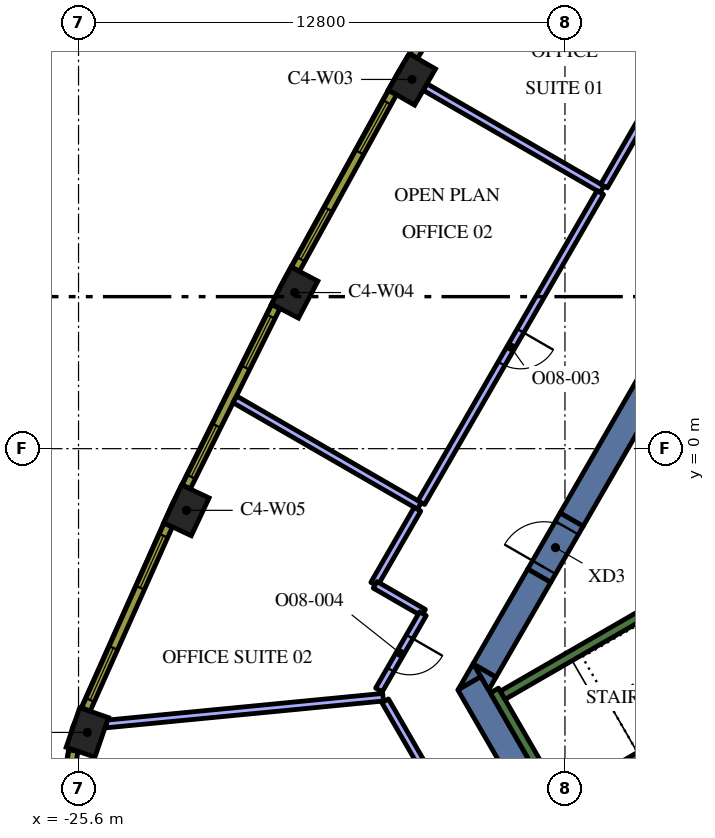
"""IFC4 building model, lengths in metres.
Left out: names, types, materials, properties, quantities, classifications, styles, units other than length and angle.
Written with IfcOpenShell. Run it as: python <this file> out.ifc"""

import sys

from ifc_helpers import new_model, si_unit, direction, frame, frame_2d, origin, origin_2d, place, context, subcontext, project, spatial, polyline, rectangle, outline, extrude, element, fill, save


model = new_model("IFC4")
c1 = context("Model", 3, precision=1e-05, world=origin(), true_north=direction((0.0, 1.0)))
c2 = subcontext(c1, "Body", "Model", "MODEL_VIEW")
j1 = project(units=[si_unit("LENGTHUNIT", "METRE"), si_unit("PLANEANGLEUNIT", "RADIAN")], contexts=[c1])
p1 = place(None, origin())
s1 = spatial("IfcSite", under=j1, at=p1, CompositionType="ELEMENT")
p2 = place(p1, origin())
s2 = spatial("IfcBuilding", under=s1, at=p2, CompositionType="ELEMENT")
p3 = place(p2, frame((0.0, 0.0, 226.8)))
s3 = spatial("IfcBuildingStorey", under=s2, at=p3, CompositionType="ELEMENT", Elevation=226.8)
for number, where, z_axis, x_axis in (
    (1, (-16.827, 9.715, 0.0), (0.0, 0.0, 1.0), (-0.5, -0.866, 0.0)),
    (2, (-19.912, 4.108, 0.0), (0.0, 0.0, 1.0), (-0.464, -0.886, 0.0)),
    (3, (-22.76, -1.623, 0.0), (0.0, 0.0, 1.0), (-0.426, -0.905, 0.0)),
    (4, (-25.369, -7.466, 0.0), (0.0, 0.0, 1.0), (-0.324, -0.946, 0.0)),
):
    element("IfcColumn", number, at=place(p3, frame(where, z_axis=z_axis, x_axis=x_axis)), inside=s3, PredefinedType="COLUMN", context=c2, shape_type="SweptSolid", body=[
        extrude(rectangle(XDim=1.1, YDim=0.8, at=origin_2d()), origin(), (0.0, 0.0, 1.0), 4.2),
    ])
p4 = place(p3, frame((-13.402, -9.487, 0.0), z_axis=(0.0, 0.0, 1.0), x_axis=(-0.500020498207, 0.866013568815, 0.0)))
e5 = element("IfcWall", 5, at=p4, inside=s3, PredefinedType="SOLIDWALL", context=c2, shape_type="SweptSolid", body=[
    extrude(rectangle(XDim=3.829, YDim=0.7, at=frame_2d((1.915, 0.0))), origin(), (0.0, 0.0, 1.0), 4.2),
])
p5 = place(p3, origin())
e6 = element("IfcWall", 6, at=p5, inside=s3, PredefinedType="SOLIDWALL", context=c2, shape_type="SweptSolid", body=[
    extrude(outline(polyline([(-15.014, -5.995), (-15.611, -6.339), (-15.213, -5.65), (-15.014, -5.995)])), origin(), (0.0, 0.0, 1.0), 4.2),
])
p6 = place(p3, frame((-13.475, -3.339, 0.0), z_axis=(0.0, 0.0, 1.0), x_axis=(-0.499944726303, -0.866057313716, 0.0)))
e7 = element("IfcWall", 7, at=p6, inside=s3, PredefinedType="SOLIDWALL", context=c2, shape_type="SweptSolid", body=[
    extrude(rectangle(XDim=2.884, YDim=0.7, at=frame_2d((1.442, 0.0))), origin(), (0.0, 0.0, 1.0), 4.2),
])
e8 = element("IfcWall", 8, at=p5, inside=s3, PredefinedType="SOLIDWALL", context=c2, shape_type="SweptSolid", body=[
    extrude(outline(polyline([(-14.809, -6.35), (-15.197, -5.678), (-14.615, -6.014), (-14.809, -6.35)])), origin(), (0.0, 0.0, 1.0), 4.2),
])
p7 = place(p3, frame((-12.625, -1.867, 0.0), z_axis=(0.0, 0.0, 1.0), x_axis=(0.500008520515, 0.866020484407, 0.0)))
e9 = element("IfcWall", 9, at=p7, inside=s3, PredefinedType="SOLIDWALL", context=c2, shape_type="SweptSolid", body=[
    extrude(rectangle(XDim=15.859, YDim=0.7, at=frame_2d((7.929, 0.0))), origin(), (0.0, 0.0, 1.0), 4.2),
])
p8 = place(p3, frame((-12.84, -9.511, 0.0), z_axis=(0.0, 0.0, 1.0), x_axis=(-0.499997733992, 0.866026712061, 0.0)))
e10 = element("IfcWall", 10, at=p8, inside=s3, PredefinedType="SOLIDWALL", context=c2, shape_type="SweptSolid", body=[
    extrude(rectangle(XDim=3.634, YDim=0.25, at=frame_2d((1.817, 0.0))), origin(), (0.0, 0.0, 1.0), 4.2),
])
p9 = place(p3, frame((-14.44, -6.49, 0.0), z_axis=(0.0, 0.0, 1.0), x_axis=(0.866022966069, 0.500004222222, 0.0)))
e11 = element("IfcWall", 11, at=p9, inside=s3, PredefinedType="SOLIDWALL", context=c2, shape_type="SweptSolid", body=[
    extrude(rectangle(XDim=6.8, YDim=0.25, at=frame_2d((3.4, 0.0))), origin(), (0.0, 0.0, 1.0), 4.2),
])
p10 = place(p3, frame((-12.84, -9.261, 0.0), z_axis=(0.0, 0.0, 1.0), x_axis=(0.866016039709, 0.500016218704, 0.0)))
e12 = element("IfcWall", 12, at=p10, inside=s3, PredefinedType="SOLIDWALL", context=c2, shape_type="SweptSolid", body=[
    extrude(rectangle(XDim=7.05, YDim=0.25, at=frame_2d((3.525, 0.0))), origin(), (0.0, 0.0, 1.0), 4.2),
])
p11 = place(p3, frame((-13.475, -3.339, 0.0), z_axis=(0.0, 0.0, 1.0), x_axis=(0.499954529098, 0.86605165483, 0.0)))
e13 = element("IfcWall", 13, at=p11, inside=s3, PredefinedType="SOLIDWALL", context=c2, shape_type="SweptSolid", body=[
    extrude(rectangle(XDim=1.7, YDim=0.7, at=frame_2d((0.85, 0.0))), origin(), (0.0, 0.0, 1.0), 4.2),
])
p12 = place(p11, frame((0.25, 0.0, 0.0)))
e14 = element("IfcOpeningElement", 14, at=p12, cuts=e13, PredefinedType="OPENING", context=c2, shape_type="SweptSolid", body=[
    extrude(rectangle(XDim=1.2, YDim=2.1, at=frame_2d((0.6, 1.05))), frame((0.0, 0.36, 0.0), z_axis=(0.0, -1.0, 0.0), x_axis=(1.0, 0.0, 0.0)), (0.0, 0.0, 1.0), 0.72),
])
p13 = place(p3, frame((-11.821, 6.825, 0.0), z_axis=(0.0, 0.0, 1.0), x_axis=(-0.866011792348, 0.500023574959, 0.0)))
e15 = element("IfcWall", 15, at=p13, inside=s3, PredefinedType="PARTITIONING", context=c2, shape_type="SweptSolid", body=[
    extrude(rectangle(XDim=5.381, YDim=0.2, at=frame_2d((2.69, 0.0))), origin(), (0.0, 0.0, 1.0), 3.45),
])
p14 = place(p3, frame((-7.061, 15.069, 0.0), z_axis=(0.0, 0.0, 1.0), x_axis=(-0.500008127286, -0.866020711443, 0.0)))
e16 = element("IfcWall", 16, at=p14, inside=s3, PredefinedType="PARTITIONING", context=c2, shape_type="SweptSolid", body=[
    extrude(rectangle(XDim=9.42, YDim=0.2, at=frame_2d((4.71, 0.0))), origin(), (0.0, 0.0, 1.0), 3.45),
])
p15 = place(p14, frame((4.2, 0.0, 0.0)))
e17 = element("IfcOpeningElement", 17, at=p15, cuts=e16, PredefinedType="OPENING", context=c2, shape_type="SweptSolid", body=[
    extrude(rectangle(XDim=1.0, YDim=2.1, at=frame_2d((0.5, 1.05))), frame((0.0, 0.11, 0.0), z_axis=(0.0, -1.0, 0.0), x_axis=(1.0, 0.0, 0.0)), (0.0, 0.0, 1.0), 0.22),
])
p16 = place(p3, frame((-16.631, -1.506, 0.0), z_axis=(0.0, 0.0, 1.0), x_axis=(-0.866045655253, 0.499964921787, 0.0)))
e18 = element("IfcWall", 18, at=p16, inside=s3, PredefinedType="PARTITIONING", context=c2, shape_type="SweptSolid", body=[
    extrude(rectangle(XDim=5.607, YDim=0.2, at=frame_2d((2.804, 0.0))), origin(), (0.0, 0.0, 1.0), 3.45),
])
p17 = place(p3, frame((-11.871, 6.738, 0.0), z_axis=(0.0, 0.0, 1.0), x_axis=(-0.500019350398, -0.866014231539, 0.0)))
e19 = element("IfcWall", 19, at=p17, inside=s3, PredefinedType="PARTITIONING", context=c2, shape_type="SweptSolid", body=[
    extrude(rectangle(XDim=9.42, YDim=0.2, at=frame_2d((4.71, 0.0))), origin(), (0.0, 0.0, 1.0), 3.45),
])
p18 = place(p17, frame((4.2, 0.0, 0.0)))
e20 = element("IfcOpeningElement", 20, at=p18, cuts=e19, PredefinedType="OPENING", context=c2, shape_type="SweptSolid", body=[
    extrude(rectangle(XDim=1.0, YDim=2.1, at=frame_2d((0.5, 1.05))), frame((0.0, 0.11, 0.0), z_axis=(0.0, -1.0, 0.0), x_axis=(1.0, 0.0, 0.0)), (0.0, 0.0, 1.0), 0.22),
])
p19 = place(p3, frame((-17.586, -6.54, 0.0), z_axis=(0.0, 0.0, 1.0), x_axis=(-0.995357542522, -0.096246363795, 0.0)))
e21 = element("IfcWall", 21, at=p19, inside=s3, PredefinedType="PARTITIONING", context=c2, shape_type="SweptSolid", body=[
    extrude(rectangle(XDim=7.318, YDim=0.2, at=frame_2d((3.659, 0.0))), origin(), (0.0, 0.0, 1.0), 3.45),
])
p20 = place(p3, frame((-16.681, -1.593, 0.0), z_axis=(0.0, 0.0, 1.0), x_axis=(-0.499985038317, -0.866034041744, 0.0)))
e22 = element("IfcWall", 22, at=p20, inside=s3, PredefinedType="PARTITIONING", context=c2, shape_type="SweptSolid", body=[
    extrude(rectangle(XDim=2.28, YDim=0.2, at=frame_2d((1.14, 0.0))), origin(), (0.0, 0.0, 1.0), 3.45),
])
p21 = place(p3, frame((-17.795, -3.582, 0.0), z_axis=(0.0, 0.0, 1.0), x_axis=(0.866016893711, -0.50001473959, 0.0)))
e23 = element("IfcWall", 23, at=p21, inside=s3, PredefinedType="PARTITIONING", context=c2, shape_type="SweptSolid", body=[
    extrude(rectangle(XDim=1.47, YDim=0.2, at=frame_2d((0.735, 0.0))), origin(), (0.0, 0.0, 1.0), 3.45),
])
p22 = place(p3, frame((-16.537, -4.343, 0.0), z_axis=(0.0, 0.0, 1.0), x_axis=(-0.500014285048, -0.866017156151, 0.0)))
e24 = element("IfcWall", 24, at=p22, inside=s3, PredefinedType="PARTITIONING", context=c2, shape_type="SweptSolid", body=[
    extrude(rectangle(XDim=2.317, YDim=0.2, at=frame_2d((1.159, 0.0))), origin(), (0.0, 0.0, 1.0), 3.45),
])
p23 = place(p22, frame((0.7, 0.0, 0.0)))
e25 = element("IfcOpeningElement", 25, at=p23, cuts=e24, PredefinedType="OPENING", context=c2, shape_type="SweptSolid", body=[
    extrude(rectangle(XDim=1.0, YDim=2.1, at=frame_2d((0.5, 1.05))), frame((0.0, 0.11, 0.0), z_axis=(0.0, -1.0, 0.0), x_axis=(1.0, 0.0, 0.0)), (0.0, 0.0, 1.0), 0.22),
])
p24 = place(p3, frame((-17.531, -6.635, 0.0), z_axis=(0.0, 0.0, 1.0), x_axis=(0.500009459589, -0.866019942219, 0.0)))
e26 = element("IfcWall", 26, at=p24, inside=s3, PredefinedType="PARTITIONING", context=c2, shape_type="SweptSolid", body=[
    extrude(rectangle(XDim=6.038, YDim=0.2, at=frame_2d((3.019, 0.0))), origin(), (0.0, 0.0, 1.0), 3.45),
])
p25 = place(p24, frame((2.5, 0.0, 0.0)))
e27 = element("IfcOpeningElement", 27, at=p25, cuts=e26, PredefinedType="OPENING", context=c2, shape_type="SweptSolid", body=[
    extrude(rectangle(XDim=1.0, YDim=2.1, at=frame_2d((0.5, 1.05))), frame((0.0, 0.11, 0.0), z_axis=(0.0, -1.0, 0.0), x_axis=(1.0, 0.0, 0.0)), (0.0, 0.0, 1.0), 0.22),
])
p26 = place(p3, frame((-14.038, 14.864, 0.0), z_axis=(0.0, 0.0, 1.0), x_axis=(-0.517846166225, -0.855473756538, 0.0)))
e28 = element("IfcWall", 28, at=p26, inside=s3, PredefinedType="SOLIDWALL", context=c2, shape_type="SweptSolid", body=[
    extrude(rectangle(XDim=5.298, YDim=0.24, at=frame_2d((2.649, 0.0))), origin(), (0.0, 0.0, 1.0), 3.95),
])
p27 = place(p26, frame((0.294, 0.0, 0.9)))
e29 = element("IfcOpeningElement", 29, at=p27, cuts=e28, PredefinedType="OPENING", context=c2, shape_type="SweptSolid", body=[
    extrude(rectangle(XDim=1.5, YDim=2.55, at=frame_2d((0.75, 1.275))), frame((0.0, 0.13, 0.0), z_axis=(0.0, -1.0, 0.0), x_axis=(1.0, 0.0, 0.0)), (0.0, 0.0, 1.0), 0.26),
])
p28 = place(p26, frame((3.504, 0.0, 0.9)))
e30 = element("IfcOpeningElement", 30, at=p28, cuts=e28, PredefinedType="OPENING", context=c2, shape_type="SweptSolid", body=[
    extrude(rectangle(XDim=1.5, YDim=2.55, at=frame_2d((0.75, 1.275))), frame((0.0, 0.13, 0.0), z_axis=(0.0, -1.0, 0.0), x_axis=(1.0, 0.0, 0.0)), (0.0, 0.0, 1.0), 0.26),
])
p29 = place(p3, frame((-17.338, 9.368, 0.0), z_axis=(0.0, 0.0, 1.0), x_axis=(-0.481925825015, -0.876212017256, 0.0)))
e31 = element("IfcWall", 31, at=p29, inside=s3, PredefinedType="SOLIDWALL", context=c2, shape_type="SweptSolid", body=[
    extrude(rectangle(XDim=5.299, YDim=0.24, at=frame_2d((2.649, 0.0))), origin(), (0.0, 0.0, 1.0), 3.95),
])
p30 = place(p29, frame((0.295, 0.0, 0.9)))
e32 = element("IfcOpeningElement", 32, at=p30, cuts=e31, PredefinedType="OPENING", context=c2, shape_type="SweptSolid", body=[
    extrude(rectangle(XDim=1.5, YDim=2.55, at=frame_2d((0.75, 1.275))), frame((0.0, 0.13, 0.0), z_axis=(0.0, -1.0, 0.0), x_axis=(1.0, 0.0, 0.0)), (0.0, 0.0, 1.0), 0.26),
])
p31 = place(p29, frame((3.504, 0.0, 0.9)))
e33 = element("IfcOpeningElement", 33, at=p31, cuts=e31, PredefinedType="OPENING", context=c2, shape_type="SweptSolid", body=[
    extrude(rectangle(XDim=1.5, YDim=2.55, at=frame_2d((0.75, 1.275))), frame((0.0, 0.13, 0.0), z_axis=(0.0, -1.0, 0.0), x_axis=(1.0, 0.0, 0.0)), (0.0, 0.0, 1.0), 0.26),
])
p32 = place(p3, frame((-20.407, 3.74, 0.0), z_axis=(0.0, 0.0, 1.0), x_axis=(-0.445129582031, -0.895466166419, 0.0)))
e34 = element("IfcWall", 34, at=p32, inside=s3, PredefinedType="SOLIDWALL", context=c2, shape_type="SweptSolid", body=[
    extrude(rectangle(XDim=5.298, YDim=0.24, at=frame_2d((2.649, 0.0))), origin(), (0.0, 0.0, 1.0), 3.95),
])
p33 = place(p32, frame((0.295, 0.0, 0.9)))
e35 = element("IfcOpeningElement", 35, at=p33, cuts=e34, PredefinedType="OPENING", context=c2, shape_type="SweptSolid", body=[
    extrude(rectangle(XDim=1.5, YDim=2.55, at=frame_2d((0.75, 1.275))), frame((0.0, 0.13, 0.0), z_axis=(0.0, -1.0, 0.0), x_axis=(1.0, 0.0, 0.0)), (0.0, 0.0, 1.0), 0.26),
])
p34 = place(p32, frame((3.504, 0.0, 0.9)))
e36 = element("IfcOpeningElement", 36, at=p34, cuts=e34, PredefinedType="OPENING", context=c2, shape_type="SweptSolid", body=[
    extrude(rectangle(XDim=1.5, YDim=2.55, at=frame_2d((0.75, 1.275))), frame((0.0, 0.13, 0.0), z_axis=(0.0, -1.0, 0.0), x_axis=(1.0, 0.0, 0.0)), (0.0, 0.0, 1.0), 0.26),
])
p35 = place(p3, frame((-23.24, -2.011, 0.0), z_axis=(0.0, 0.0, 1.0), x_axis=(-0.407579651789, -0.913169659728, 0.0)))
e37 = element("IfcWall", 37, at=p35, inside=s3, PredefinedType="SOLIDWALL", context=c2, shape_type="SweptSolid", body=[
    extrude(rectangle(XDim=5.311, YDim=0.24, at=frame_2d((2.655, 0.0))), origin(), (0.0, 0.0, 1.0), 3.95),
])
p36 = place(p35, frame((0.306, 0.0, 0.9)))
e38 = element("IfcOpeningElement", 38, at=p36, cuts=e37, PredefinedType="OPENING", context=c2, shape_type="SweptSolid", body=[
    extrude(rectangle(XDim=1.5, YDim=2.55, at=frame_2d((0.75, 1.275))), frame((0.0, 0.13, 0.0), z_axis=(0.0, -1.0, 0.0), x_axis=(1.0, 0.0, 0.0)), (0.0, 0.0, 1.0), 0.26),
])
p37 = place(p35, frame((3.539, 0.0, 0.9)))
e39 = element("IfcOpeningElement", 39, at=p37, cuts=e37, PredefinedType="OPENING", context=c2, shape_type="SweptSolid", body=[
    extrude(rectangle(XDim=1.5, YDim=2.55, at=frame_2d((0.75, 1.275))), frame((0.0, 0.13, 0.0), z_axis=(0.0, -1.0, 0.0), x_axis=(1.0, 0.0, 0.0)), (0.0, 0.0, 1.0), 0.26),
])
p38 = place(p3, frame((-25.734, -7.945, 0.0), z_axis=(0.0, 0.0, 1.0), x_axis=(-0.167660055546, -0.985844869021, 0.0)))
e40 = element("IfcWall", 40, at=p38, inside=s3, PredefinedType="SOLIDWALL", context=c2, shape_type="SweptSolid", body=[
    extrude(rectangle(XDim=2.609, YDim=0.24, at=frame_2d((1.305, 0.0))), origin(), (0.0, 0.0, 1.0), 3.95),
])
p39 = place(p38, frame((0.805, 0.0, 0.9)))
e41 = element("IfcOpeningElement", 41, at=p39, cuts=e40, PredefinedType="OPENING", context=c2, shape_type="SweptSolid", body=[
    extrude(rectangle(XDim=1.0, YDim=2.55, at=frame_2d((0.5, 1.275))), frame((0.0, 0.13, 0.0), z_axis=(0.0, -1.0, 0.0), x_axis=(1.0, 0.0, 0.0)), (0.0, 0.0, 1.0), 0.26),
])
p40 = place(p12, origin())
e42 = element("IfcDoor", 42, at=p40, inside=s3, OperationType="SINGLE_SWING_LEFT", PredefinedType="DOOR", context=c2, shape_type="SweptSolid", body=[
    extrude(rectangle(XDim=1.2, YDim=2.1, at=frame_2d((0.6, 1.05))), frame((0.0, 0.025, 0.0), z_axis=(0.0, -1.0, 0.0), x_axis=(1.0, 0.0, 0.0)), (0.0, 0.0, 1.0), 0.05),
])
fill(e14, e42)
p41 = place(p18, origin())
e43 = element("IfcDoor", 43, at=p41, inside=s3, OperationType="SINGLE_SWING_LEFT", PredefinedType="DOOR", context=c2, shape_type="SweptSolid", body=[
    extrude(rectangle(XDim=1.0, YDim=2.1, at=frame_2d((0.5, 1.05))), frame((0.0, 0.025, 0.0), z_axis=(0.0, -1.0, 0.0), x_axis=(1.0, 0.0, 0.0)), (0.0, 0.0, 1.0), 0.05),
])
fill(e20, e43)
p42 = place(p23, origin())
e44 = element("IfcDoor", 44, at=p42, inside=s3, OperationType="SINGLE_SWING_RIGHT", PredefinedType="DOOR", context=c2, shape_type="SweptSolid", body=[
    extrude(rectangle(XDim=1.0, YDim=2.1, at=frame_2d((0.5, 1.05))), frame((0.0, 0.025, 0.0), z_axis=(0.0, -1.0, 0.0), x_axis=(1.0, 0.0, 0.0)), (0.0, 0.0, 1.0), 0.05),
])
fill(e25, e44)
p43 = place(p30, origin())
e45 = element("IfcWindow", 45, at=p43, inside=s3, PartitioningType="SINGLE_PANEL", PredefinedType="WINDOW", context=c2, shape_type="SweptSolid", body=[
    extrude(rectangle(XDim=1.5, YDim=2.55, at=frame_2d((0.75, 1.275))), frame((0.0, 0.04, 0.0), z_axis=(0.0, -1.0, 0.0), x_axis=(1.0, 0.0, 0.0)), (0.0, 0.0, 1.0), 0.06),
])
fill(e32, e45)
p44 = place(p31, origin())
e46 = element("IfcWindow", 46, at=p44, inside=s3, PartitioningType="SINGLE_PANEL", PredefinedType="WINDOW", context=c2, shape_type="SweptSolid", body=[
    extrude(rectangle(XDim=1.5, YDim=2.55, at=frame_2d((0.75, 1.275))), frame((0.0, 0.04, 0.0), z_axis=(0.0, -1.0, 0.0), x_axis=(1.0, 0.0, 0.0)), (0.0, 0.0, 1.0), 0.06),
])
fill(e33, e46)
p45 = place(p33, origin())
e47 = element("IfcWindow", 47, at=p45, inside=s3, PartitioningType="SINGLE_PANEL", PredefinedType="WINDOW", context=c2, shape_type="SweptSolid", body=[
    extrude(rectangle(XDim=1.5, YDim=2.55, at=frame_2d((0.75, 1.275))), frame((0.0, 0.04, 0.0), z_axis=(0.0, -1.0, 0.0), x_axis=(1.0, 0.0, 0.0)), (0.0, 0.0, 1.0), 0.06),
])
fill(e35, e47)
p46 = place(p34, origin())
e48 = element("IfcWindow", 48, at=p46, inside=s3, PartitioningType="SINGLE_PANEL", PredefinedType="WINDOW", context=c2, shape_type="SweptSolid", body=[
    extrude(rectangle(XDim=1.5, YDim=2.55, at=frame_2d((0.75, 1.275))), frame((0.0, 0.04, 0.0), z_axis=(0.0, -1.0, 0.0), x_axis=(1.0, 0.0, 0.0)), (0.0, 0.0, 1.0), 0.06),
])
fill(e36, e48)
p47 = place(p36, origin())
e49 = element("IfcWindow", 49, at=p47, inside=s3, PartitioningType="SINGLE_PANEL", PredefinedType="WINDOW", context=c2, shape_type="SweptSolid", body=[
    extrude(rectangle(XDim=1.5, YDim=2.55, at=frame_2d((0.75, 1.275))), frame((0.0, 0.04, 0.0), z_axis=(0.0, -1.0, 0.0), x_axis=(1.0, 0.0, 0.0)), (0.0, 0.0, 1.0), 0.06),
])
fill(e38, e49)
p48 = place(p37, origin())
e50 = element("IfcWindow", 50, at=p48, inside=s3, PartitioningType="SINGLE_PANEL", PredefinedType="WINDOW", context=c2, shape_type="SweptSolid", body=[
    extrude(rectangle(XDim=1.5, YDim=2.55, at=frame_2d((0.75, 1.275))), frame((0.0, 0.04, 0.0), z_axis=(0.0, -1.0, 0.0), x_axis=(1.0, 0.0, 0.0)), (0.0, 0.0, 1.0), 0.06),
])
fill(e39, e50)
save(model, sys.argv[1])
